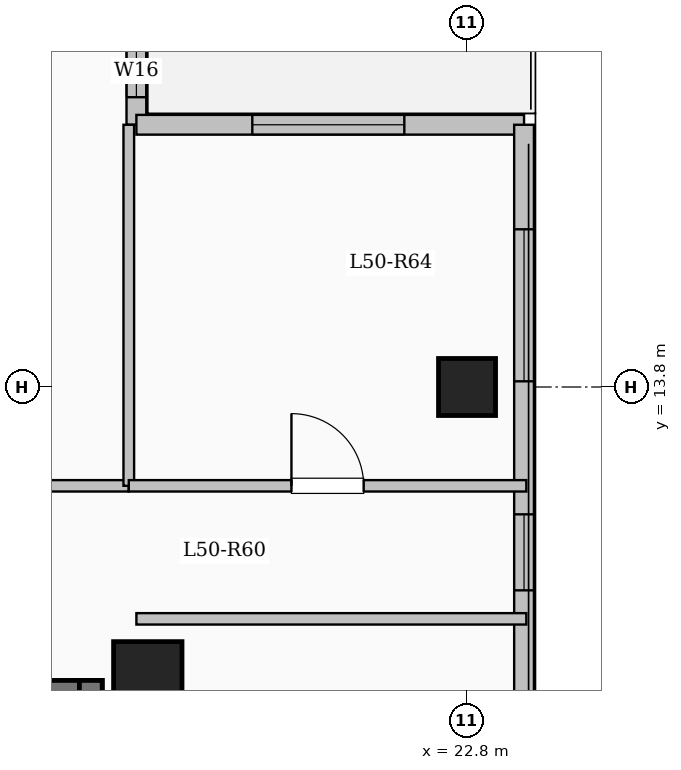
"""IFC4 building model, lengths in metres.
Left out: names, types, materials, properties, quantities, classifications, styles, units other than length and angle.
Written with IfcOpenShell. Run it as: python <this file> out.ifc"""

import sys

from ifc_helpers import new_model, si_unit, direction, frame, frame_2d, origin, origin_2d, place, context, subcontext, project, spatial, rectangle, extrude, element, fill, save


model = new_model("IFC4")
c1 = context("Model", 3, precision=1e-05, world=origin(), true_north=direction((0.0, 1.0)))
c2 = subcontext(c1, "Body", "Model", "MODEL_VIEW")
j1 = project(units=[si_unit("LENGTHUNIT", "METRE"), si_unit("PLANEANGLEUNIT", "RADIAN")], contexts=[c1])
p1 = place(None, origin())
s1 = spatial("IfcSite", under=j1, at=p1, CompositionType="ELEMENT")
p2 = place(p1, origin())
s2 = spatial("IfcBuilding", under=s1, at=p2, CompositionType="ELEMENT")
p3 = place(p2, frame((0.0, 0.0, 186.9)))
s3 = spatial("IfcBuildingStorey", under=s2, at=p3, CompositionType="ELEMENT", Elevation=186.9)
p4 = place(p3, frame((18.6, 10.0, 0.0), z_axis=(0.0, 0.0, 1.0), x_axis=(1.0, 0.0, 0.0)))
e1 = element("IfcColumn", 1, at=p4, inside=s3, PredefinedType="COLUMN", context=c2, shape_type="SweptSolid", body=[
    extrude(rectangle(XDim=0.9, YDim=0.9, at=origin_2d()), origin(), (0.0, 0.0, 1.0), 3.35),
])
p5 = place(p3, frame((22.8, 13.8, 0.0), z_axis=(0.0, 0.0, 1.0), x_axis=(1.0, 0.0, 0.0)))
e2 = element("IfcColumn", 2, at=p5, inside=s3, PredefinedType="COLUMN", context=c2, shape_type="SweptSolid", body=[
    extrude(rectangle(XDim=0.75, YDim=0.75, at=origin_2d()), origin(), (0.0, 0.0, 1.0), 3.35),
])
p6 = place(p3, frame((18.45, 20.85, 0.0), z_axis=(0.0, 0.0, 1.0), x_axis=(0.0, -1.0, 0.0)))
e3 = element("IfcWall", 3, at=p6, inside=s3, PredefinedType="SOLIDWALL", context=c2, shape_type="SweptSolid", body=[
    extrude(rectangle(XDim=3.6, YDim=0.26, at=frame_2d((1.8, 0.0))), origin(), (0.0, 0.0, 1.0), 3.1),
])
p7 = place(p6, frame((1.25, 0.0, 0.0)))
e4 = element("IfcOpeningElement", 4, at=p7, cuts=e3, PredefinedType="OPENING", context=c2, shape_type="SweptSolid", body=[
    extrude(rectangle(XDim=1.1, YDim=2.2, at=frame_2d((0.55, 1.1))), frame((0.0, 0.14, 0.0), z_axis=(0.0, -1.0, 0.0), x_axis=(1.0, 0.0, 0.0)), (0.0, 0.0, 1.0), 0.28),
])
p8 = place(p6, frame((2.538, 0.0, 0.95)))
e5 = element("IfcOpeningElement", 5, at=p8, cuts=e3, PredefinedType="OPENING", context=c2, shape_type="SweptSolid", body=[
    extrude(rectangle(XDim=0.7, YDim=1.5, at=frame_2d((0.35, 0.75))), frame((0.0, 0.14, 0.0), z_axis=(0.0, -1.0, 0.0), x_axis=(1.0, 0.0, 0.0)), (0.0, 0.0, 1.0), 0.28),
])
p9 = place(p3, frame((18.45, 17.25, 0.0), z_axis=(0.0, 0.0, 1.0), x_axis=(1.0, 0.0, 0.0)))
e6 = element("IfcWall", 6, at=p9, inside=s3, PredefinedType="SOLIDWALL", context=c2, shape_type="SweptSolid", body=[
    extrude(rectangle(XDim=5.1, YDim=0.26, at=frame_2d((2.55, 0.0))), origin(), (0.0, 0.0, 1.0), 3.1),
])
p10 = place(p9, frame((1.525, 0.0, 0.9)))
e7 = element("IfcOpeningElement", 7, at=p10, cuts=e6, PredefinedType="OPENING", context=c2, shape_type="SweptSolid", body=[
    extrude(rectangle(XDim=2.0, YDim=1.7, at=frame_2d((1.0, 0.85))), frame((0.0, 0.14, 0.0), z_axis=(0.0, -1.0, 0.0), x_axis=(1.0, 0.0, 0.0)), (0.0, 0.0, 1.0), 0.28),
])
p11 = place(p3, frame((23.55, 17.25, 0.0), z_axis=(0.0, 0.0, 1.0), x_axis=(0.0, -1.0, 0.0)))
e8 = element("IfcWall", 8, at=p11, inside=s3, PredefinedType="SOLIDWALL", context=c2, shape_type="SweptSolid", body=[
    extrude(rectangle(XDim=34.5, YDim=0.26, at=frame_2d((17.25, 0.0))), origin(), (0.0, 0.0, 1.0), 3.1),
])
p12 = place(p11, frame((1.375, 0.0, 0.9)))
e9 = element("IfcOpeningElement", 9, at=p12, cuts=e8, PredefinedType="OPENING", context=c2, shape_type="SweptSolid", body=[
    extrude(rectangle(XDim=2.0, YDim=1.7, at=frame_2d((1.0, 0.85))), frame((0.0, 0.14, 0.0), z_axis=(0.0, -1.0, 0.0), x_axis=(1.0, 0.0, 0.0)), (0.0, 0.0, 1.0), 0.28),
])
p13 = place(p11, frame((5.125, 0.0, 0.95)))
e10 = element("IfcOpeningElement", 10, at=p13, cuts=e8, PredefinedType="OPENING", context=c2, shape_type="SweptSolid", body=[
    extrude(rectangle(XDim=1.0, YDim=1.5, at=frame_2d((0.5, 0.75))), frame((0.0, 0.14, 0.0), z_axis=(0.0, -1.0, 0.0), x_axis=(1.0, 0.0, 0.0)), (0.0, 0.0, 1.0), 0.28),
])
p14 = place(p11, frame((14.5, 0.0, 0.9)))
e11 = element("IfcOpeningElement", 11, at=p14, cuts=e8, PredefinedType="OPENING", context=c2, shape_type="SweptSolid", body=[
    extrude(rectangle(XDim=2.0, YDim=1.7, at=frame_2d((1.0, 0.85))), frame((0.0, 0.14, 0.0), z_axis=(0.0, -1.0, 0.0), x_axis=(1.0, 0.0, 0.0)), (0.0, 0.0, 1.0), 0.28),
])
p15 = place(p11, frame((24.975, 0.0, 0.95)))
e12 = element("IfcOpeningElement", 12, at=p15, cuts=e8, PredefinedType="OPENING", context=c2, shape_type="SweptSolid", body=[
    extrude(rectangle(XDim=1.2, YDim=1.5, at=frame_2d((0.6, 0.75))), frame((0.0, 0.14, 0.0), z_axis=(0.0, -1.0, 0.0), x_axis=(1.0, 0.0, 0.0)), (0.0, 0.0, 1.0), 0.28),
])
p16 = place(p11, frame((29.475, 0.0, 0.9)))
e13 = element("IfcOpeningElement", 13, at=p16, cuts=e8, PredefinedType="OPENING", context=c2, shape_type="SweptSolid", body=[
    extrude(rectangle(XDim=2.2, YDim=1.75, at=frame_2d((1.1, 0.875))), frame((0.0, 0.14, 0.0), z_axis=(0.0, -1.0, 0.0), x_axis=(1.0, 0.0, 0.0)), (0.0, 0.0, 1.0), 0.28),
])
p17 = place(p3, frame((10.0, 9.79, 0.0), z_axis=(0.0, 0.0, 1.0), x_axis=(1.0, 0.0, 0.0)))
e14 = element("IfcWall", 14, at=p17, inside=s3, PredefinedType="SHEAR", context=c2, shape_type="SweptSolid", body=[
    extrude(rectangle(XDim=8.0, YDim=0.3, at=frame_2d((4.0, 0.0))), origin(), (0.0, 0.0, 1.0), 3.35),
])
p18 = place(p3, frame((17.85, 6.35, 0.0), z_axis=(0.0, 0.0, 1.0), x_axis=(0.0, 1.0, 0.0)))
e15 = element("IfcWall", 15, at=p18, inside=s3, PredefinedType="SHEAR", context=c2, shape_type="SweptSolid", body=[
    extrude(rectangle(XDim=3.59, YDim=0.3, at=frame_2d((1.795, 0.0))), origin(), (0.0, 0.0, 1.0), 3.35),
])
p19 = place(p3, frame((3.85, 12.5, 0.0), z_axis=(0.0, 0.0, 1.0), x_axis=(1.0, 0.0, 0.0)))
e16 = element("IfcWall", 16, at=p19, inside=s3, PredefinedType="PARTITIONING", context=c2, shape_type="SweptSolid", body=[
    extrude(rectangle(XDim=14.5, YDim=0.15, at=frame_2d((7.25, 0.0))), origin(), (0.0, 0.0, 1.0), 3.1),
])
p20 = place(p19, frame((2.186, 0.0, 0.0)))
e17 = element("IfcOpeningElement", 17, at=p20, cuts=e16, PredefinedType="OPENING", context=c2, shape_type="SweptSolid", body=[
    extrude(rectangle(XDim=0.95, YDim=2.15, at=frame_2d((0.475, 1.075))), frame((0.0, 0.085, 0.0), z_axis=(0.0, -1.0, 0.0), x_axis=(1.0, 0.0, 0.0)), (0.0, 0.0, 1.0), 0.17),
])
p21 = place(p19, frame((7.379, 0.0, 0.0)))
e18 = element("IfcOpeningElement", 18, at=p21, cuts=e16, PredefinedType="OPENING", context=c2, shape_type="SweptSolid", body=[
    extrude(rectangle(XDim=0.95, YDim=2.15, at=frame_2d((0.475, 1.075))), frame((0.0, 0.085, 0.0), z_axis=(0.0, -1.0, 0.0), x_axis=(1.0, 0.0, 0.0)), (0.0, 0.0, 1.0), 0.17),
])
p22 = place(p19, frame((11.998, 0.0, 0.0)))
e19 = element("IfcOpeningElement", 19, at=p22, cuts=e16, PredefinedType="OPENING", context=c2, shape_type="SweptSolid", body=[
    extrude(rectangle(XDim=0.95, YDim=2.15, at=frame_2d((0.475, 1.075))), frame((0.0, 0.085, 0.0), z_axis=(0.0, -1.0, 0.0), x_axis=(1.0, 0.0, 0.0)), (0.0, 0.0, 1.0), 0.17),
])
p23 = place(p3, frame((18.45, 10.75, 0.0), z_axis=(0.0, 0.0, 1.0), x_axis=(1.0, 0.0, 0.0)))
e20 = element("IfcWall", 20, at=p23, inside=s3, PredefinedType="PARTITIONING", context=c2, shape_type="SweptSolid", body=[
    extrude(rectangle(XDim=5.13, YDim=0.15, at=frame_2d((2.565, 0.0))), origin(), (0.0, 0.0, 1.0), 3.1),
])
p24 = place(p3, frame((18.35, 12.5, 0.0), z_axis=(0.0, 0.0, 1.0), x_axis=(0.0, 1.0, 0.0)))
e21 = element("IfcWall", 21, at=p24, inside=s3, PredefinedType="PARTITIONING", context=c2, shape_type="SweptSolid", body=[
    extrude(rectangle(XDim=4.75, YDim=0.14, at=frame_2d((2.375, 0.0))), origin(), (0.0, 0.0, 1.0), 3.1),
])
p25 = place(p3, frame((18.35, 12.5, 0.0), z_axis=(0.0, 0.0, 1.0), x_axis=(1.0, 0.0, 0.0)))
e22 = element("IfcWall", 22, at=p25, inside=s3, PredefinedType="PARTITIONING", context=c2, shape_type="SweptSolid", body=[
    extrude(rectangle(XDim=5.23, YDim=0.15, at=frame_2d((2.615, 0.0))), origin(), (0.0, 0.0, 1.0), 3.1),
])
p26 = place(p25, frame((2.14, 0.0, 0.0)))
e23 = element("IfcOpeningElement", 23, at=p26, cuts=e22, PredefinedType="OPENING", context=c2, shape_type="SweptSolid", body=[
    extrude(rectangle(XDim=0.95, YDim=2.15, at=frame_2d((0.475, 1.075))), frame((0.0, 0.085, 0.0), z_axis=(0.0, -1.0, 0.0), x_axis=(1.0, 0.0, 0.0)), (0.0, 0.0, 1.0), 0.17),
])
p27 = place(p8, origin())
e24 = element("IfcWindow", 24, at=p27, inside=s3, PartitioningType="SINGLE_PANEL", PredefinedType="WINDOW", context=c2, shape_type="SweptSolid", body=[
    extrude(rectangle(XDim=0.7, YDim=1.5, at=frame_2d((0.35, 0.75))), frame((0.0, 0.03, 0.0), z_axis=(0.0, -1.0, 0.0), x_axis=(1.0, 0.0, 0.0)), (0.0, 0.0, 1.0), 0.06),
])
fill(e5, e24)
p28 = place(p10, origin())
e25 = element("IfcWindow", 25, at=p28, inside=s3, PartitioningType="SINGLE_PANEL", PredefinedType="WINDOW", context=c2, shape_type="SweptSolid", body=[
    extrude(rectangle(XDim=2.0, YDim=1.7, at=frame_2d((1.0, 0.85))), frame((0.0, 0.03, 0.0), z_axis=(0.0, -1.0, 0.0), x_axis=(1.0, 0.0, 0.0)), (0.0, 0.0, 1.0), 0.06),
])
fill(e7, e25)
p29 = place(p12, origin())
e26 = element("IfcWindow", 26, at=p29, inside=s3, PartitioningType="SINGLE_PANEL", PredefinedType="WINDOW", context=c2, shape_type="SweptSolid", body=[
    extrude(rectangle(XDim=2.0, YDim=1.7, at=frame_2d((1.0, 0.85))), frame((0.0, 0.03, 0.0), z_axis=(0.0, -1.0, 0.0), x_axis=(1.0, 0.0, 0.0)), (0.0, 0.0, 1.0), 0.06),
])
fill(e9, e26)
p30 = place(p13, origin())
e27 = element("IfcWindow", 27, at=p30, inside=s3, PartitioningType="SINGLE_PANEL", PredefinedType="WINDOW", context=c2, shape_type="SweptSolid", body=[
    extrude(rectangle(XDim=1.0, YDim=1.5, at=frame_2d((0.5, 0.75))), frame((0.0, 0.03, 0.0), z_axis=(0.0, -1.0, 0.0), x_axis=(1.0, 0.0, 0.0)), (0.0, 0.0, 1.0), 0.06),
])
fill(e10, e27)
p31 = place(p26, origin())
e28 = element("IfcDoor", 28, at=p31, inside=s3, OperationType="SINGLE_SWING_LEFT", PredefinedType="DOOR", context=c2, shape_type="SweptSolid", body=[
    extrude(rectangle(XDim=0.95, YDim=2.15, at=frame_2d((0.475, 1.075))), frame((0.0, 0.025, 0.0), z_axis=(0.0, -1.0, 0.0), x_axis=(1.0, 0.0, 0.0)), (0.0, 0.0, 1.0), 0.05),
])
fill(e23, e28)
save(model, sys.argv[1])
